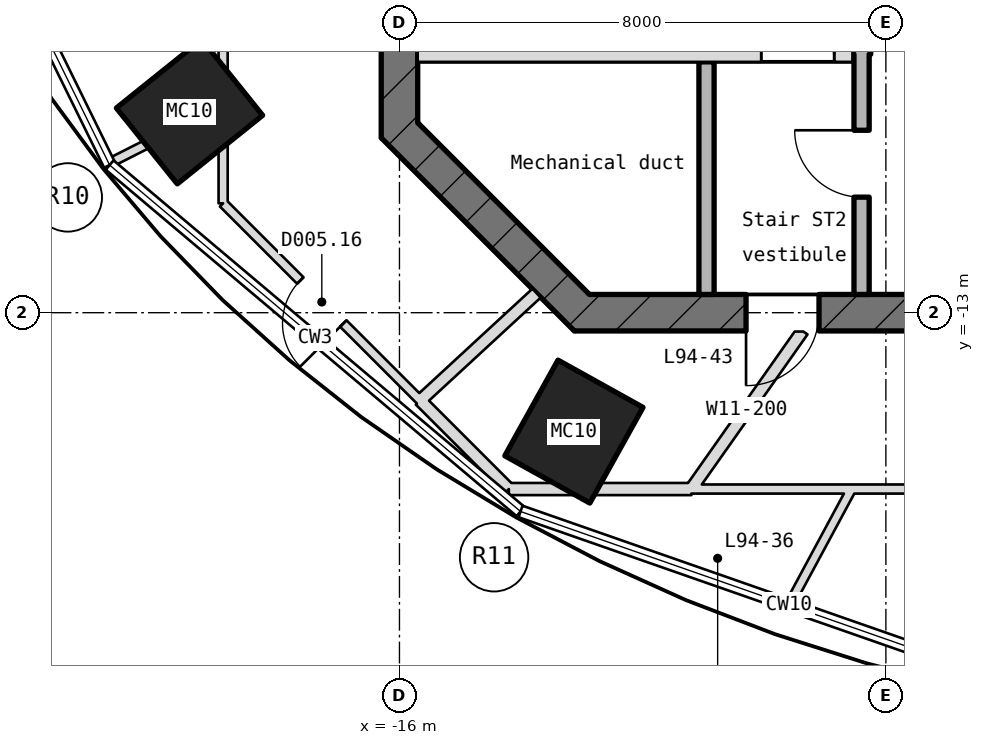
"""IFC4 building model, lengths in metres.
Left out: names, types, materials, properties, quantities, classifications, styles, units other than length and angle.
Written with IfcOpenShell. Run it as: python <this file> out.ifc"""

import sys

from ifc_helpers import new_model, si_unit, direction, frame, frame_2d, origin, origin_2d, place, context, subcontext, project, spatial, rectangle, hollow_rectangle, extrude, element, fill, save


model = new_model("IFC4")
c1 = context("Model", 3, precision=1e-05, world=origin(), true_north=direction((0.0, 1.0)))
c2 = subcontext(c1, "Body", "Model", "MODEL_VIEW")
j1 = project(units=[si_unit("LENGTHUNIT", "METRE"), si_unit("PLANEANGLEUNIT", "RADIAN")], contexts=[c1])
p1 = place(None, origin())
s1 = spatial("IfcSite", under=j1, at=p1, CompositionType="ELEMENT")
p2 = place(p1, origin())
s2 = spatial("IfcBuilding", under=s1, at=p2, CompositionType="ELEMENT")
p3 = place(p2, frame((0.0, 0.0, 418.55)))
s3 = spatial("IfcBuildingStorey", under=s2, at=p3, CompositionType="ELEMENT", Elevation=418.55)
for number, where, z_axis, x_axis in (
    (1, (-19.453, -9.694, -0.2), (0.0, 0.0, 1.0), (-0.626, 0.78, 0.0)),
    (2, (-13.131, -14.955, -0.2), (0.0, 0.0, 1.0), (-0.874, 0.486, 0.0)),
):
    element("IfcColumn", number, at=place(p3, frame(where, z_axis=z_axis, x_axis=x_axis)), inside=s3, PredefinedType="COLUMN", context=c2, shape_type="SweptSolid", body=[
        extrude(hollow_rectangle(XDim=1.6, YDim=1.8, WallThickness=0.045, at=origin_2d()), origin(), (0.0, 0.0, 1.0), 4.9),
    ])
p4 = place(p3, frame((-16.0, 10.124, -0.2), z_axis=(0.0, 0.0, 1.0), x_axis=(0.0, -1.0, 0.0)))
e3 = element("IfcWall", 3, at=p4, inside=s3, PredefinedType="SHEAR", context=c2, shape_type="SweptSolid", body=[
    extrude(rectangle(XDim=20.249, YDim=0.6, at=frame_2d((10.124, 0.0))), origin(), (0.0, 0.0, 1.0), 4.9),
])
p5 = place(p4, frame((8.924, 0.0, 0.2)))
e4 = element("IfcOpeningElement", 4, at=p5, cuts=e3, PredefinedType="OPENING", context=c2, shape_type="SweptSolid", body=[
    extrude(rectangle(XDim=2.4, YDim=2.1, at=frame_2d((1.2, 1.05))), frame((0.0, 0.31, 0.0), z_axis=(0.0, -1.0, 0.0), x_axis=(1.0, 0.0, 0.0)), (0.0, 0.0, 1.0), 0.62),
])
p6 = place(p4, frame((5.524, 0.0, 0.2)))
e5 = element("IfcOpeningElement", 5, at=p6, cuts=e3, PredefinedType="OPENING", context=c2, shape_type="SweptSolid", body=[
    extrude(rectangle(XDim=1.2, YDim=2.1, at=frame_2d((0.6, 1.05))), frame((0.0, 0.31, 0.0), z_axis=(0.0, -1.0, 0.0), x_axis=(1.0, 0.0, 0.0)), (0.0, 0.0, 1.0), 0.62),
])
p7 = place(p3, frame((-16.088, -9.912, -0.2), z_axis=(0.0, 0.0, 1.0), x_axis=(0.707106781187, -0.707106781187, 0.0)))
e6 = element("IfcWall", 6, at=p7, inside=s3, PredefinedType="SHEAR", context=c2, shape_type="SweptSolid", body=[
    extrude(rectangle(XDim=4.491, YDim=0.6, at=frame_2d((2.246, 0.0))), origin(), (0.0, 0.0, 1.0), 4.9),
])
p8 = place(p3, frame((-13.124, -13.0, -0.2), z_axis=(0.0, 0.0, 1.0), x_axis=(1.0, 0.0, 0.0)))
e7 = element("IfcWall", 7, at=p8, inside=s3, PredefinedType="SHEAR", context=c2, shape_type="SweptSolid", body=[
    extrude(rectangle(XDim=26.249, YDim=0.6, at=frame_2d((13.124, 0.0))), origin(), (0.0, 0.0, 1.0), 4.9),
])
p9 = place(p8, frame((2.824, 0.0, 0.2)))
e8 = element("IfcOpeningElement", 8, at=p9, cuts=e7, PredefinedType="OPENING", context=c2, shape_type="SweptSolid", body=[
    extrude(rectangle(XDim=1.2, YDim=2.1, at=frame_2d((0.6, 1.05))), frame((0.0, 0.31, 0.0), z_axis=(0.0, -1.0, 0.0), x_axis=(1.0, 0.0, 0.0)), (0.0, 0.0, 1.0), 0.62),
])
p10 = place(p8, frame((6.824, 0.0, 0.2)))
e9 = element("IfcOpeningElement", 9, at=p10, cuts=e7, PredefinedType="OPENING", context=c2, shape_type="SweptSolid", body=[
    extrude(rectangle(XDim=1.4, YDim=2.1, at=frame_2d((0.7, 1.05))), frame((0.0, 0.31, 0.0), z_axis=(0.0, -1.0, 0.0), x_axis=(1.0, 0.0, 0.0)), (0.0, 0.0, 1.0), 0.62),
])
p11 = place(p8, frame((15.424, 0.0, 0.2)))
e10 = element("IfcOpeningElement", 10, at=p11, cuts=e7, PredefinedType="OPENING", context=c2, shape_type="SweptSolid", body=[
    extrude(rectangle(XDim=1.4, YDim=2.1, at=frame_2d((0.7, 1.05))), frame((0.0, 0.31, 0.0), z_axis=(0.0, -1.0, 0.0), x_axis=(1.0, 0.0, 0.0)), (0.0, 0.0, 1.0), 0.62),
])
p12 = place(p3, frame((-15.7, -8.75, -0.2), z_axis=(0.0, 0.0, 1.0), x_axis=(1.0, 0.0, 0.0)))
e11 = element("IfcWall", 11, at=p12, inside=s3, PredefinedType="SHEAR", context=c2, shape_type="SweptSolid", body=[
    extrude(rectangle(XDim=7.15, YDim=0.25, at=frame_2d((3.575, 0.0))), origin(), (0.0, 0.0, 1.0), 4.9),
])
p13 = place(p12, frame((5.65, 0.0, 0.2)))
e12 = element("IfcOpeningElement", 12, at=p13, cuts=e11, PredefinedType="OPENING", context=c2, shape_type="SweptSolid", body=[
    extrude(rectangle(XDim=1.2, YDim=2.1, at=frame_2d((0.6, 1.05))), frame((0.0, 0.135, 0.0), z_axis=(0.0, -1.0, 0.0), x_axis=(1.0, 0.0, 0.0)), (0.0, 0.0, 1.0), 0.27),
])
p14 = place(p3, frame((-10.95, -12.7, 0.0), z_axis=(0.0, 0.0, 1.0), x_axis=(0.0, 1.0, 0.0)))
e13 = element("IfcWall", 13, at=p14, inside=s3, PredefinedType="STANDARD", context=c2, shape_type="SweptSolid", body=[
    extrude(rectangle(XDim=3.825, YDim=0.25, at=frame_2d((1.913, 0.0))), origin(), (0.0, 0.0, 1.0), 4.7),
])
p15 = place(p3, frame((-8.4, -12.7, 0.0), z_axis=(0.0, 0.0, 1.0), x_axis=(0.0, 1.0, 0.0)))
e14 = element("IfcWall", 14, at=p15, inside=s3, PredefinedType="STANDARD", context=c2, shape_type="SweptSolid", body=[
    extrude(rectangle(XDim=3.95, YDim=0.25, at=frame_2d((1.975, 0.0))), origin(), (0.0, 0.0, 1.0), 4.7),
])
p16 = place(p15, frame((1.6, 0.0, 0.0)))
e15 = element("IfcOpeningElement", 15, at=p16, cuts=e14, PredefinedType="OPENING", context=c2, shape_type="SweptSolid", body=[
    extrude(rectangle(XDim=1.1, YDim=2.1, at=frame_2d((0.55, 1.05))), frame((0.0, 0.135, 0.0), z_axis=(0.0, -1.0, 0.0), x_axis=(1.0, 0.0, 0.0)), (0.0, 0.0, 1.0), 0.27),
])
p17 = place(p3, frame((-8.4, -8.75, -0.2), z_axis=(0.0, 0.0, 1.0), x_axis=(0.0, 1.0, 0.0)))
e16 = element("IfcWall", 16, at=p17, inside=s3, PredefinedType="SHEAR", context=c2, shape_type="SweptSolid", body=[
    extrude(rectangle(XDim=6.25, YDim=0.3, at=frame_2d((3.125, 0.0))), origin(), (0.0, 0.0, 1.0), 4.9),
])
p18 = place(p3, frame((-11.202, -15.9, 0.0), z_axis=(0.0, 0.0, 1.0), x_axis=(1.0, 0.0, 0.0)))
e17 = element("IfcWall", 17, at=p18, inside=s3, PredefinedType="PARTITIONING", context=c2, shape_type="SweptSolid", body=[
    extrude(rectangle(XDim=21.614, YDim=0.15, at=frame_2d((10.807, 0.0))), origin(), (0.0, 0.0, 1.0), 4.7),
])
p19 = place(p18, frame((8.207, 0.0, 0.0)))
e18 = element("IfcOpeningElement", 18, at=p19, cuts=e17, PredefinedType="OPENING", context=c2, shape_type="SweptSolid", body=[
    extrude(rectangle(XDim=1.0, YDim=2.1, at=frame_2d((0.5, 1.05))), frame((0.0, 0.085, 0.0), z_axis=(0.0, -1.0, 0.0), x_axis=(1.0, 0.0, 0.0)), (0.0, 0.0, 1.0), 0.17),
])
p20 = place(p18, frame((17.697, 0.0, 0.0)))
e19 = element("IfcOpeningElement", 19, at=p20, cuts=e17, PredefinedType="OPENING", context=c2, shape_type="SweptSolid", body=[
    extrude(rectangle(XDim=1.0, YDim=2.1, at=frame_2d((0.5, 1.05))), frame((0.0, 0.085, 0.0), z_axis=(0.0, -1.0, 0.0), x_axis=(1.0, 0.0, 0.0)), (0.0, 0.0, 1.0), 0.17),
])
p21 = place(p3, frame((-20.762, -10.536, 0.0), z_axis=(0.0, 0.0, 1.0), x_axis=(0.891793061208, 0.452443516895, 0.0)))
e20 = element("IfcWall", 20, at=p21, inside=s3, PredefinedType="PARTITIONING", context=c2, shape_type="SweptSolid", body=[
    extrude(rectangle(XDim=2.088, YDim=0.15, at=frame_2d((1.044, 0.0))), origin(), (0.0, 0.0, 1.0), 4.7),
])
p22 = place(p3, frame((-9.584, -17.793, 0.0), z_axis=(0.0, 0.0, 1.0), x_axis=(0.474126911312, 0.880456513389, 0.0)))
e21 = element("IfcWall", 21, at=p22, inside=s3, PredefinedType="PARTITIONING", context=c2, shape_type="SweptSolid", body=[
    extrude(rectangle(XDim=2.15, YDim=0.15, at=frame_2d((1.075, 0.0))), origin(), (0.0, 0.0, 1.0), 4.7),
])
p23 = place(p3, frame((-18.9, -11.201, 0.0), z_axis=(0.0, 0.0, 1.0), x_axis=(0.0, 1.0, 0.0)))
e22 = element("IfcWall", 22, at=p23, inside=s3, PredefinedType="PARTITIONING", context=c2, shape_type="SweptSolid", body=[
    extrude(rectangle(XDim=22.403, YDim=0.15, at=frame_2d((11.201, 0.0))), origin(), (0.0, 0.0, 1.0), 4.7),
])
p24 = place(p23, frame((18.22, 0.0, 0.0)))
e23 = element("IfcOpeningElement", 23, at=p24, cuts=e22, PredefinedType="OPENING", context=c2, shape_type="SweptSolid", body=[
    extrude(rectangle(XDim=1.0, YDim=2.1, at=frame_2d((0.5, 1.05))), frame((0.0, 0.085, 0.0), z_axis=(0.0, -1.0, 0.0), x_axis=(1.0, 0.0, 0.0)), (0.0, 0.0, 1.0), 0.17),
])
p25 = place(p23, frame((7.824, 0.0, 0.0)))
e24 = element("IfcOpeningElement", 24, at=p25, cuts=e22, PredefinedType="OPENING", context=c2, shape_type="SweptSolid", body=[
    extrude(rectangle(XDim=1.0, YDim=2.1, at=frame_2d((0.5, 1.05))), frame((0.0, 0.085, 0.0), z_axis=(0.0, -1.0, 0.0), x_axis=(1.0, 0.0, 0.0)), (0.0, 0.0, 1.0), 0.17),
])
p26 = place(p3, frame((-15.658, -14.443, 0.0), z_axis=(0.0, 0.0, 1.0), x_axis=(-0.707080156687, 0.707133404684, 0.0)))
e25 = element("IfcWall", 25, at=p26, inside=s3, PredefinedType="PARTITIONING", context=c2, shape_type="SweptSolid", body=[
    extrude(rectangle(XDim=4.585, YDim=0.15, at=frame_2d((2.292, 0.0))), origin(), (0.0, 0.0, 1.0), 4.7),
])
p27 = place(p26, frame((1.79, 0.0, 0.0)))
e26 = element("IfcOpeningElement", 26, at=p27, cuts=e25, PredefinedType="OPENING", context=c2, shape_type="SweptSolid", body=[
    extrude(rectangle(XDim=1.0, YDim=2.1, at=frame_2d((0.5, 1.05))), frame((0.0, 0.085, 0.0), z_axis=(0.0, -1.0, 0.0), x_axis=(1.0, 0.0, 0.0)), (0.0, 0.0, 1.0), 0.17),
])
p28 = place(p3, frame((-14.201, -15.9, 0.0), z_axis=(0.0, 0.0, 1.0), x_axis=(1.0, 0.0, 0.0)))
e27 = element("IfcWall", 27, at=p28, inside=s3, PredefinedType="PARTITIONING", context=c2, shape_type="SweptSolid", body=[
    extrude(rectangle(XDim=3.003, YDim=0.2, at=frame_2d((1.501, 0.0))), origin(), (0.0, 0.0, 1.0), 4.7),
])
p29 = place(p3, frame((-15.658, -14.443, 0.0), z_axis=(0.0, 0.0, 1.0), x_axis=(0.735008442526, 0.678057954319, 0.0)))
e28 = element("IfcWall", 28, at=p29, inside=s3, PredefinedType="PARTITIONING", context=c2, shape_type="SweptSolid", body=[
    extrude(rectangle(XDim=2.602, YDim=0.2, at=frame_2d((1.301, 0.0))), origin(), (0.0, 0.0, 1.0), 4.7),
])
p30 = place(p3, frame((-11.202, -15.9, 0.0), z_axis=(0.0, 0.0, 1.0), x_axis=(0.575968689272, 0.817471754239, 0.0)))
e29 = element("IfcWall", 29, at=p30, inside=s3, PredefinedType="PARTITIONING", context=c2, shape_type="SweptSolid", body=[
    extrude(rectangle(XDim=3.18, YDim=0.2, at=frame_2d((1.59, 0.0))), origin(), (0.0, 0.0, 1.0), 4.7),
])
p31 = place(p3, frame((-14.201, -15.9, 0.0), z_axis=(0.0, 0.0, 1.0), x_axis=(-0.707106781187, 0.707106781187, 0.0)))
e30 = element("IfcWall", 30, at=p31, inside=s3, PredefinedType="PARTITIONING", context=c2, shape_type="SweptSolid", body=[
    extrude(rectangle(XDim=2.063, YDim=0.2, at=frame_2d((1.031, 0.0))), origin(), (0.0, 0.0, 1.0), 4.7),
])
p32 = place(p13, origin())
e31 = element("IfcDoor", 31, at=p32, inside=s3, OperationType="SINGLE_SWING_RIGHT", PredefinedType="DOOR", context=c2, shape_type="SweptSolid", body=[
    extrude(rectangle(XDim=1.2, YDim=2.1, at=frame_2d((0.6, 1.05))), frame((0.0, 0.025, 0.0), z_axis=(0.0, -1.0, 0.0), x_axis=(1.0, 0.0, 0.0)), (0.0, 0.0, 1.0), 0.05),
])
fill(e12, e31)
p33 = place(p16, origin())
e32 = element("IfcDoor", 32, at=p33, inside=s3, OperationType="SINGLE_SWING_RIGHT", PredefinedType="DOOR", context=c2, shape_type="SweptSolid", body=[
    extrude(rectangle(XDim=1.1, YDim=2.1, at=frame_2d((0.55, 1.05))), frame((0.0, 0.025, 0.0), z_axis=(0.0, -1.0, 0.0), x_axis=(1.0, 0.0, 0.0)), (0.0, 0.0, 1.0), 0.05),
])
fill(e15, e32)
p34 = place(p9, frame((1.2, 0.0, 0.0), z_axis=(0.0, 0.0, 1.0), x_axis=(-1.0, 0.0, 0.0)))
e33 = element("IfcDoor", 33, at=p34, inside=s3, OperationType="SINGLE_SWING_LEFT", PredefinedType="DOOR", context=c2, shape_type="SweptSolid", body=[
    extrude(rectangle(XDim=1.2, YDim=2.1, at=frame_2d((0.6, 1.05))), frame((0.0, 0.025, 0.0), z_axis=(0.0, -1.0, 0.0), x_axis=(1.0, 0.0, 0.0)), (0.0, 0.0, 1.0), 0.05),
])
fill(e8, e33)
p35 = place(p27, origin())
e34 = element("IfcDoor", 34, at=p35, inside=s3, OperationType="SINGLE_SWING_RIGHT", PredefinedType="DOOR", context=c2, shape_type="SweptSolid", body=[
    extrude(rectangle(XDim=1.0, YDim=2.1, at=frame_2d((0.5, 1.05))), frame((0.0, 0.025, 0.0), z_axis=(0.0, -1.0, 0.0), x_axis=(1.0, 0.0, 0.0)), (0.0, 0.0, 1.0), 0.05),
])
fill(e26, e34)
save(model, sys.argv[1])
